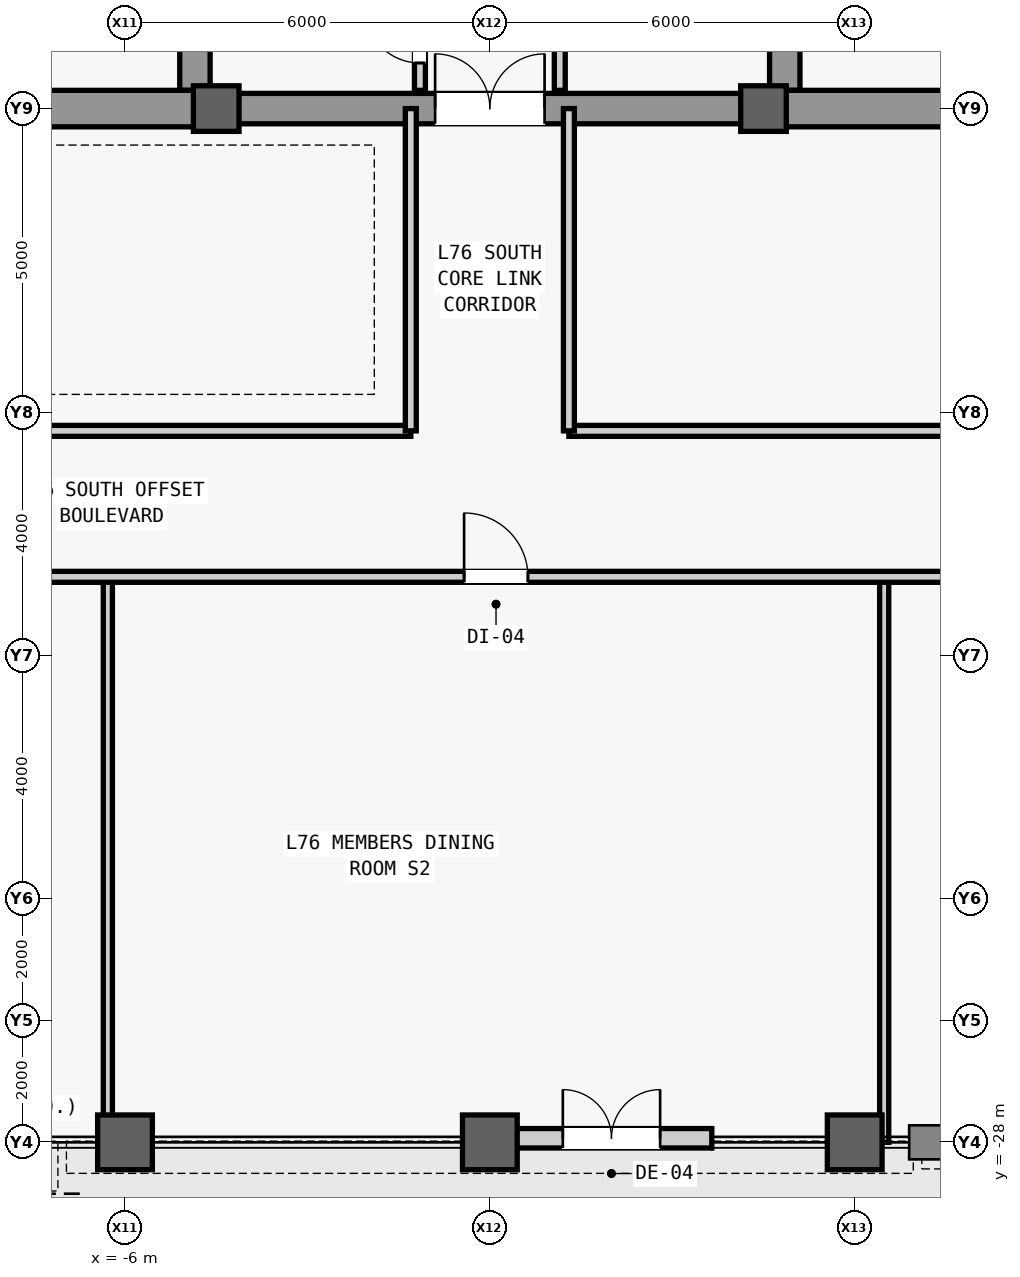
"""IFC4 building model, lengths in metres.
Left out: names, types, materials, properties, quantities, classifications, styles, units other than length and angle.
Written with IfcOpenShell. Run it as: python <this file> out.ifc"""

import sys

from ifc_helpers import new_model, si_unit, direction, frame, frame_2d, origin, origin_2d, place, context, subcontext, project, spatial, rectangle, hollow_rectangle, extrude, source, transform, mapped, element, fill, save


model = new_model("IFC4")
c1 = context("Model", 3, precision=1e-05, world=origin(), true_north=direction((0.0, 1.0)))
c2 = subcontext(c1, "Body", "Model", "MODEL_VIEW")
j1 = project(units=[si_unit("LENGTHUNIT", "METRE"), si_unit("PLANEANGLEUNIT", "RADIAN")], contexts=[c1])
p1 = place(None, origin())
s1 = spatial("IfcSite", under=j1, at=p1, CompositionType="ELEMENT")
p2 = place(p1, origin())
s2 = spatial("IfcBuilding", under=s1, at=p2, CompositionType="ELEMENT")
p3 = place(p2, frame((0.0, 0.0, 321.5)))
s3 = spatial("IfcBuildingStorey", under=s2, at=p3, CompositionType="ELEMENT", Elevation=321.5)
m1 = source(origin(), c2, "Body", "SweptSolid", [
    extrude(rectangle(XDim=21.4, YDim=0.5, at=frame_2d((10.7, 0.0))), origin(), (0.0, 0.0, 1.0), 4.54),
])
for number, where, z_axis, x_axis in (
    (1, (-4.85, -10.7, 0.0), (0.0, 0.0, 1.0), (0.0, 1.0, 0.0)),
    (2, (4.85, -10.7, 0.0), (0.0, 0.0, 1.0), (0.0, 1.0, 0.0)),
):
    element("IfcWall", number, at=place(p3, frame(where, z_axis=z_axis, x_axis=x_axis)), inside=s3, PredefinedType="SHEAR", context=c2, shape_type="MappedRepresentation", body=[
        mapped(m1, transform((0.0, 0.0, 0.0), scale=1.0)),
    ])
m2 = source(origin(), c2, "Body", "SweptSolid", [
    extrude(rectangle(XDim=5.9, YDim=0.6, at=frame_2d((2.95, 0.0))), origin(), (0.0, 0.0, 1.0), 4.54),
])
for number, where, z_axis, x_axis in (
    (3, (-10.75, -11.0, 0.0), (0.0, 0.0, 1.0), (1.0, 0.0, 0.0)),
    (4, (4.85, -11.0, 0.0), (0.0, 0.0, 1.0), (1.0, 0.0, 0.0)),
):
    element("IfcWall", number, at=place(p3, frame(where, z_axis=z_axis, x_axis=x_axis)), inside=s3, PredefinedType="SHEAR", context=c2, shape_type="MappedRepresentation", body=[
        mapped(m2, transform((0.0, 0.0, 0.0), scale=1.0)),
    ])
m3 = source(origin(), c2, "Body", "SweptSolid", [
    extrude(rectangle(XDim=9.2, YDim=0.5, at=frame_2d((4.6, 0.0))), origin(), (0.0, 0.0, 1.0), 4.54),
])
p4 = place(p3, frame((-4.6, -11.0, 0.0), z_axis=(0.0, 0.0, 1.0), x_axis=(1.0, 0.0, 0.0)))
e5 = element("IfcWall", 5, at=p4, inside=s3, PredefinedType="SHEAR", context=c2, shape_type="MappedRepresentation", body=[
    mapped(m3, transform((0.0, 0.0, 0.0), scale=1.0)),
])
m4 = source(origin(), c2, "Body", "SweptSolid", [
    extrude(rectangle(XDim=1.8, YDim=2.25, at=frame_2d((0.9, 1.125))), frame((0.0, 0.26, 0.0), z_axis=(0.0, -1.0, 0.0), x_axis=(1.0, 0.0, 0.0)), (0.0, 0.0, 1.0), 0.52),
])
p5 = place(p4, frame((3.7, 0.0, 0.0)))
e6 = element("IfcOpeningElement", 6, at=p5, cuts=e5, PredefinedType="OPENING", context=c2, shape_type="MappedRepresentation", body=[
    mapped(m4, transform((0.0, 0.0, 0.0), scale=1.0)),
])
m5 = source(origin(), c2, "Body", "SweptSolid", [
    extrude(hollow_rectangle(XDim=0.9, YDim=0.9, WallThickness=0.05, at=origin_2d()), origin(), (0.0, 0.0, 1.0), 4.8),
])
p6 = place(p3, frame((-6.0, -28.0, 0.0), z_axis=(0.0, 0.0, 1.0), x_axis=(1.0, 0.0, 0.0)))
e7 = element("IfcColumn", 7, at=p6, inside=s3, PredefinedType="COLUMN", context=c2, shape_type="MappedRepresentation", body=[
    mapped(m5, transform((0.0, 0.0, 0.0), scale=1.0)),
])
m6 = source(origin(), c2, "Body", "SweptSolid", [
    extrude(rectangle(XDim=0.75, YDim=0.75, at=origin_2d()), origin(), (0.0, 0.0, 1.0), 4.8),
])
p7 = place(p3, frame((-4.5, -11.0, 0.0), z_axis=(0.0, 0.0, 1.0), x_axis=(1.0, 0.0, 0.0)))
e8 = element("IfcColumn", 8, at=p7, inside=s3, PredefinedType="COLUMN", context=c2, shape_type="MappedRepresentation", body=[
    mapped(m6, transform((0.0, 0.0, 0.0), scale=1.0)),
])
p8 = place(p3, frame((0.0, -28.0, 0.0), z_axis=(0.0, 0.0, 1.0), x_axis=(1.0, 0.0, 0.0)))
e9 = element("IfcColumn", 9, at=p8, inside=s3, PredefinedType="COLUMN", context=c2, shape_type="MappedRepresentation", body=[
    mapped(m5, transform((0.0, 0.0, 0.0), scale=1.0)),
])
p9 = place(p3, frame((4.5, -11.0, 0.0), z_axis=(0.0, 0.0, 1.0), x_axis=(1.0, 0.0, 0.0)))
e10 = element("IfcColumn", 10, at=p9, inside=s3, PredefinedType="COLUMN", context=c2, shape_type="MappedRepresentation", body=[
    mapped(m6, transform((0.0, 0.0, 0.0), scale=1.0)),
])
p10 = place(p3, frame((6.0, -28.0, 0.0), z_axis=(0.0, 0.0, 1.0), x_axis=(1.0, 0.0, 0.0)))
e11 = element("IfcColumn", 11, at=p10, inside=s3, PredefinedType="COLUMN", context=c2, shape_type="MappedRepresentation", body=[
    mapped(m5, transform((0.0, 0.0, 0.0), scale=1.0)),
])
m7 = source(origin(), c2, "Body", "SweptSolid", [
    extrude(rectangle(XDim=3.3, YDim=0.32, at=frame_2d((1.65, 0.0))), origin(), (0.0, 0.0, 1.0), 3.951),
])
p11 = place(p3, frame((0.35, -27.933, 0.0), z_axis=(0.0, 0.0, 1.0), x_axis=(1.0, 0.0, 0.0)))
e12 = element("IfcWall", 12, at=p11, inside=s3, PredefinedType="STANDARD", context=c2, shape_type="MappedRepresentation", body=[
    mapped(m7, transform((0.0, 0.0, 0.0), scale=1.0)),
])
m8 = source(origin(), c2, "Body", "SweptSolid", [
    extrude(rectangle(XDim=1.6, YDim=2.25, at=frame_2d((0.8, 1.125))), frame((0.0, 0.17, 0.0), z_axis=(0.0, -1.0, 0.0), x_axis=(1.0, 0.0, 0.0)), (0.0, 0.0, 1.0), 0.34),
])
p12 = place(p11, frame((0.85, 0.0, 0.0)))
e13 = element("IfcOpeningElement", 13, at=p12, cuts=e12, PredefinedType="OPENING", context=c2, shape_type="MappedRepresentation", body=[
    mapped(m8, transform((0.0, 0.0, 0.0), scale=1.0)),
])
m9 = source(origin(), c2, "Body", "SweptSolid", [
    extrude(rectangle(XDim=5.4, YDim=0.18, at=frame_2d((2.7, 0.0))), origin(), (0.0, 0.0, 1.0), 4.54),
])
p13 = place(p3, frame((-1.15, -10.7, 0.0), z_axis=(0.0, 0.0, 1.0), x_axis=(0.0, 1.0, 0.0)))
e14 = element("IfcWall", 14, at=p13, inside=s3, PredefinedType="PARTITIONING", context=c2, shape_type="MappedRepresentation", body=[
    mapped(m9, transform((0.0, 0.0, 0.0), scale=1.0)),
])
m10 = source(origin(), c2, "Body", "SweptSolid", [
    extrude(rectangle(XDim=0.9, YDim=2.15, at=frame_2d((0.45, 1.075))), frame((0.0, 0.1, 0.0), z_axis=(0.0, -1.0, 0.0), x_axis=(1.0, 0.0, 0.0)), (0.0, 0.0, 1.0), 0.2),
])
p14 = place(p13, frame((0.45, 0.0, 0.0)))
e15 = element("IfcOpeningElement", 15, at=p14, cuts=e14, PredefinedType="OPENING", context=c2, shape_type="MappedRepresentation", body=[
    mapped(m10, transform((0.0, 0.0, 0.0), scale=1.0)),
])
p15 = place(p13, frame((2.25, 0.0, 0.0)))
e16 = element("IfcOpeningElement", 16, at=p15, cuts=e14, PredefinedType="OPENING", context=c2, shape_type="MappedRepresentation", body=[
    mapped(m10, transform((0.0, 0.0, 0.0), scale=1.0)),
])
p16 = place(p13, frame((4.05, 0.0, 0.0)))
e17 = element("IfcOpeningElement", 17, at=p16, cuts=e14, PredefinedType="OPENING", context=c2, shape_type="MappedRepresentation", body=[
    mapped(m10, transform((0.0, 0.0, 0.0), scale=1.0)),
])
p17 = place(p3, frame((1.15, -10.7, 0.0), z_axis=(0.0, 0.0, 1.0), x_axis=(0.0, 1.0, 0.0)))
e18 = element("IfcWall", 18, at=p17, inside=s3, PredefinedType="PARTITIONING", context=c2, shape_type="MappedRepresentation", body=[
    mapped(m9, transform((0.0, 0.0, 0.0), scale=1.0)),
])
p18 = place(p17, frame((0.95, 0.0, 0.0)))
e19 = element("IfcOpeningElement", 19, at=p18, cuts=e18, PredefinedType="OPENING", context=c2, shape_type="MappedRepresentation", body=[
    mapped(m10, transform((0.0, 0.0, 0.0), scale=1.0)),
])
p19 = place(p17, frame((3.65, 0.0, 0.0)))
e20 = element("IfcOpeningElement", 20, at=p19, cuts=e18, PredefinedType="OPENING", context=c2, shape_type="MappedRepresentation", body=[
    mapped(m10, transform((0.0, 0.0, 0.0), scale=1.0)),
])
m11 = source(origin(), c2, "Body", "SweptSolid", [
    extrude(rectangle(XDim=16.1, YDim=0.18, at=frame_2d((8.05, 0.0))), origin(), (0.0, 0.0, 1.0), 4.54),
])
p20 = place(p3, frame((-17.4, -16.3, 0.0), z_axis=(0.0, 0.0, 1.0), x_axis=(1.0, 0.0, 0.0)))
e21 = element("IfcWall", 21, at=p20, inside=s3, PredefinedType="PARTITIONING", context=c2, shape_type="MappedRepresentation", body=[
    mapped(m11, transform((0.0, 0.0, 0.0), scale=1.0)),
])
p21 = place(p20, frame((8.95, 0.0, 0.0)))
e22 = element("IfcOpeningElement", 22, at=p21, cuts=e21, PredefinedType="OPENING", context=c2, shape_type="MappedRepresentation", body=[
    mapped(m10, transform((0.0, 0.0, 0.0), scale=1.0)),
])
m12 = source(origin(), c2, "Body", "SweptSolid", [
    extrude(rectangle(XDim=5.3, YDim=0.18, at=frame_2d((2.65, 0.0))), origin(), (0.0, 0.0, 1.0), 4.54),
])
p22 = place(p3, frame((-1.3, -16.3, 0.0), z_axis=(0.0, 0.0, 1.0), x_axis=(0.0, 1.0, 0.0)))
e23 = element("IfcWall", 23, at=p22, inside=s3, PredefinedType="PARTITIONING", context=c2, shape_type="MappedRepresentation", body=[
    mapped(m12, transform((0.0, 0.0, 0.0), scale=1.0)),
])
m13 = source(origin(), c2, "Body", "SweptSolid", [
    extrude(rectangle(XDim=14.05, YDim=0.18, at=frame_2d((7.025, 0.0))), origin(), (0.0, 0.0, 1.0), 4.54),
])
p23 = place(p3, frame((1.3, -16.3, 0.0), z_axis=(0.0, 0.0, 1.0), x_axis=(1.0, 0.0, 0.0)))
e24 = element("IfcWall", 24, at=p23, inside=s3, PredefinedType="PARTITIONING", context=c2, shape_type="MappedRepresentation", body=[
    mapped(m13, transform((0.0, 0.0, 0.0), scale=1.0)),
])
p24 = place(p23, frame((6.25, 0.0, 0.0)))
e25 = element("IfcOpeningElement", 25, at=p24, cuts=e24, PredefinedType="OPENING", context=c2, shape_type="MappedRepresentation", body=[
    mapped(m10, transform((0.0, 0.0, 0.0), scale=1.0)),
])
p25 = place(p3, frame((1.3, -16.3, 0.0), z_axis=(0.0, 0.0, 1.0), x_axis=(0.0, 1.0, 0.0)))
e26 = element("IfcWall", 26, at=p25, inside=s3, PredefinedType="PARTITIONING", context=c2, shape_type="MappedRepresentation", body=[
    mapped(m12, transform((0.0, 0.0, 0.0), scale=1.0)),
])
m14 = source(origin(), c2, "Body", "SweptSolid", [
    extrude(rectangle(XDim=9.3, YDim=0.15, at=frame_2d((4.65, 0.0))), origin(), (0.0, 0.0, 1.0), 2.7),
])
p26 = place(p3, frame((-6.282, -28.0, 0.0), z_axis=(0.0, 0.0, 1.0), x_axis=(0.0, 1.0, 0.0)))
e27 = element("IfcWall", 27, at=p26, inside=s3, PredefinedType="PARTITIONING", context=c2, shape_type="MappedRepresentation", body=[
    mapped(m14, transform((0.0, 0.0, 0.0), scale=1.0)),
])
m15 = source(origin(), c2, "Body", "SweptSolid", [
    extrude(rectangle(XDim=9.3, YDim=0.15, at=frame_2d((4.65, 0.0))), origin(), (0.0, 0.0, 1.0), 4.54),
])
p27 = place(p3, frame((6.485, -28.0, 0.0), z_axis=(0.0, 0.0, 1.0), x_axis=(0.0, 1.0, 0.0)))
e28 = element("IfcWall", 28, at=p27, inside=s3, PredefinedType="PARTITIONING", context=c2, shape_type="MappedRepresentation", body=[
    mapped(m15, transform((0.0, 0.0, 0.0), scale=1.0)),
])
m16 = source(origin(), c2, "Body", "SweptSolid", [
    extrude(rectangle(XDim=37.55, YDim=0.18, at=frame_2d((18.775, 0.0))), origin(), (0.0, 0.0, 1.0), 4.54),
])
p28 = place(p3, frame((-19.8, -18.7, 0.0), z_axis=(0.0, 0.0, 1.0), x_axis=(1.0, 0.0, 0.0)))
e29 = element("IfcWall", 29, at=p28, inside=s3, PredefinedType="PARTITIONING", context=c2, shape_type="MappedRepresentation", body=[
    mapped(m16, transform((0.0, 0.0, 0.0), scale=1.0)),
])
m17 = source(origin(), c2, "Body", "SweptSolid", [
    extrude(rectangle(XDim=1.05, YDim=2.2, at=frame_2d((0.525, 1.1))), frame((0.0, 0.1, 0.0), z_axis=(0.0, -1.0, 0.0), x_axis=(1.0, 0.0, 0.0)), (0.0, 0.0, 1.0), 0.2),
])
p29 = place(p28, frame((6.734, 0.0, 0.0)))
e30 = element("IfcOpeningElement", 30, at=p29, cuts=e29, PredefinedType="OPENING", context=c2, shape_type="MappedRepresentation", body=[
    mapped(m17, transform((0.0, 0.0, 0.0), scale=1.0)),
])
p30 = place(p28, frame((19.376, 0.0, 0.0)))
e31 = element("IfcOpeningElement", 31, at=p30, cuts=e29, PredefinedType="OPENING", context=c2, shape_type="MappedRepresentation", body=[
    mapped(m17, transform((0.0, 0.0, 0.0), scale=1.0)),
])
p31 = place(p28, frame((30.867, 0.0, 0.0)))
e32 = element("IfcOpeningElement", 32, at=p31, cuts=e29, PredefinedType="OPENING", context=c2, shape_type="MappedRepresentation", body=[
    mapped(m17, transform((0.0, 0.0, 0.0), scale=1.0)),
])
m18 = source(origin(), c2, "Body", "SweptSolid", [
    extrude(rectangle(XDim=1.6, YDim=2.25, at=frame_2d((0.8, 1.125))), frame((0.0, 0.025, 0.0), z_axis=(0.0, -1.0, 0.0), x_axis=(1.0, 0.0, 0.0)), (0.0, 0.0, 1.0), 0.05),
])
p32 = place(p12, origin())
e33 = element("IfcDoor", 33, at=p32, inside=s3, OperationType="DOUBLE_DOOR_SINGLE_SWING", PredefinedType="DOOR", context=c2, shape_type="MappedRepresentation", body=[
    mapped(m18, transform((0.0, 0.0, 0.0), scale=1.0)),
])
fill(e13, e33)
m19 = source(origin(), c2, "Body", "SweptSolid", [
    extrude(rectangle(XDim=0.9, YDim=2.15, at=frame_2d((0.45, 1.075))), frame((0.0, 0.025, 0.0), z_axis=(0.0, -1.0, 0.0), x_axis=(1.0, 0.0, 0.0)), (0.0, 0.0, 1.0), 0.05),
])
p33 = place(p14, origin())
e34 = element("IfcDoor", 34, at=p33, inside=s3, OperationType="SINGLE_SWING_RIGHT", PredefinedType="DOOR", context=c2, shape_type="MappedRepresentation", body=[
    mapped(m19, transform((0.0, 0.0, 0.0), scale=1.0)),
])
fill(e15, e34)
m20 = source(origin(), c2, "Body", "SweptSolid", [
    extrude(rectangle(XDim=1.8, YDim=2.25, at=frame_2d((0.9, 1.125))), frame((0.0, 0.025, 0.0), z_axis=(0.0, -1.0, 0.0), x_axis=(1.0, 0.0, 0.0)), (0.0, 0.0, 1.0), 0.05),
])
p34 = place(p5, origin())
e35 = element("IfcDoor", 35, at=p34, inside=s3, OperationType="SINGLE_SWING_LEFT", PredefinedType="DOOR", context=c2, shape_type="MappedRepresentation", body=[
    mapped(m20, transform((0.0, 0.0, 0.0), scale=1.0)),
])
fill(e6, e35)
m21 = source(origin(), c2, "Body", "SweptSolid", [
    extrude(rectangle(XDim=1.05, YDim=2.2, at=frame_2d((0.525, 1.1))), frame((0.0, 0.025, 0.0), z_axis=(0.0, -1.0, 0.0), x_axis=(1.0, 0.0, 0.0)), (0.0, 0.0, 1.0), 0.05),
])
p35 = place(p30, origin())
e36 = element("IfcDoor", 36, at=p35, inside=s3, OperationType="SINGLE_SWING_LEFT", PredefinedType="DOOR", context=c2, shape_type="MappedRepresentation", body=[
    mapped(m21, transform((0.0, 0.0, 0.0), scale=1.0)),
])
fill(e31, e36)
save(model, sys.argv[1])
